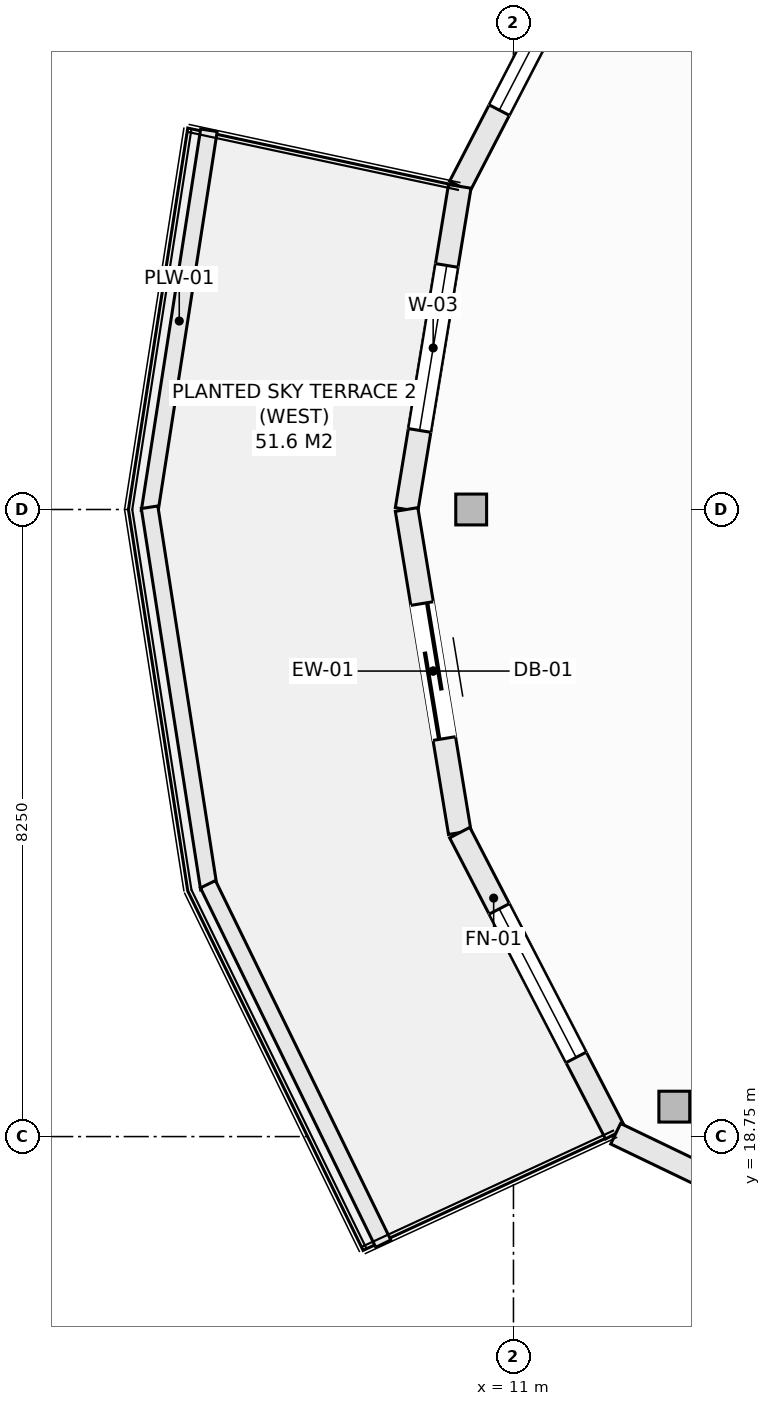
"""IFC4 building model, lengths in metres.
Left out: names, types, materials, properties, quantities, classifications, styles, units other than length and angle.
Written with IfcOpenShell. Run it as: python <this file> out.ifc"""

import sys

from ifc_helpers import new_model, si_unit, direction, frame, frame_2d, origin, origin_2d, place, context, subcontext, project, spatial, rectangle, hollow_rectangle, extrude, element, fill, save


model = new_model("IFC4")
c1 = context("Model", 3, precision=1e-05, world=origin(), true_north=direction((0.0, 1.0)))
c2 = subcontext(c1, "Body", "Model", "MODEL_VIEW")
j1 = project(units=[si_unit("LENGTHUNIT", "METRE"), si_unit("PLANEANGLEUNIT", "RADIAN")], contexts=[c1])
p1 = place(None, origin())
s1 = spatial("IfcSite", under=j1, at=p1, CompositionType="ELEMENT")
p2 = place(p1, origin())
s2 = spatial("IfcBuilding", under=s1, at=p2, CompositionType="ELEMENT")
p3 = place(p2, frame((0.0, 0.0, 262.4)))
s3 = spatial("IfcBuildingStorey", under=s2, at=p3, CompositionType="ELEMENT", Elevation=262.4)
for number, where, z_axis, x_axis in (
    (1, (10.444, 27.0, -0.27), (0.0, 0.0, 1.0), (1.0, 0.0, 0.0)),
    (2, (13.116, 19.144, -0.27), (0.0, 0.0, 1.0), (1.0, 0.0, 0.0)),
):
    element("IfcColumn", number, at=place(p3, frame(where, z_axis=z_axis, x_axis=x_axis)), inside=s3, PredefinedType="COLUMN", context=c2, shape_type="SweptSolid", body=[
        extrude(hollow_rectangle(XDim=0.406, YDim=0.406, WallThickness=0.016, at=origin_2d()), origin(), (0.0, 0.0, 1.0), 3.3),
    ])
p4 = place(p3, frame((10.293, 31.251, 0.0), z_axis=(0.0, 0.0, 1.0), x_axis=(0.459801070243, 0.888021945564, 0.0)))
e3 = element("IfcWall", 3, at=p4, inside=s3, PredefinedType="SOLIDWALL", context=c2, shape_type="SweptSolid", body=[
    extrude(rectangle(XDim=4.461, YDim=0.3, at=frame_2d((2.23, 0.0))), origin(), (0.0, 0.0, 1.0), 2.605),
])
p5 = place(p4, frame((1.13, 0.0, 0.72)))
e4 = element("IfcOpeningElement", 4, at=p5, cuts=e3, PredefinedType="OPENING", context=c2, shape_type="SweptSolid", body=[
    extrude(rectangle(XDim=2.2, YDim=1.65, at=frame_2d((1.1, 0.825))), frame((0.0, 0.16, 0.0), z_axis=(0.0, -1.0, 0.0), x_axis=(1.0, 0.0, 0.0)), (0.0, 0.0, 1.0), 0.32),
])
p6 = place(p3, frame((9.594, 27.0, 0.0), z_axis=(0.0, 0.0, 1.0), x_axis=(0.162404622434, 0.98672424649, 0.0)))
e5 = element("IfcWall", 5, at=p6, inside=s3, PredefinedType="SOLIDWALL", context=c2, shape_type="SweptSolid", body=[
    extrude(rectangle(XDim=4.308, YDim=0.3, at=frame_2d((2.154, 0.0))), origin(), (0.0, 0.0, 1.0), 2.605),
])
p7 = place(p6, frame((1.054, 0.0, 0.72)))
e6 = element("IfcOpeningElement", 6, at=p7, cuts=e5, PredefinedType="OPENING", context=c2, shape_type="SweptSolid", body=[
    extrude(rectangle(XDim=2.2, YDim=1.65, at=frame_2d((1.1, 0.825))), frame((0.0, 0.16, 0.0), z_axis=(0.0, -1.0, 0.0), x_axis=(1.0, 0.0, 0.0)), (0.0, 0.0, 1.0), 0.32),
])
p8 = place(p3, frame((9.594, 27.0, 0.0), z_axis=(0.0, 0.0, 1.0), x_axis=(0.162404622434, -0.98672424649, 0.0)))
e7 = element("IfcWall", 7, at=p8, inside=s3, PredefinedType="SOLIDWALL", context=c2, shape_type="SweptSolid", body=[
    extrude(rectangle(XDim=4.308, YDim=0.3, at=frame_2d((2.154, 0.0))), origin(), (0.0, 0.0, 1.0), 2.605),
])
p9 = place(p8, frame((1.254, 0.0, 0.0)))
e8 = element("IfcOpeningElement", 8, at=p9, cuts=e7, PredefinedType="OPENING", context=c2, shape_type="SweptSolid", body=[
    extrude(rectangle(XDim=1.8, YDim=2.25, at=frame_2d((0.9, 1.125))), frame((0.0, 0.16, 0.0), z_axis=(0.0, -1.0, 0.0), x_axis=(1.0, 0.0, 0.0)), (0.0, 0.0, 1.0), 0.32),
])
p10 = place(p3, frame((10.293, 22.749, 0.0), z_axis=(0.0, 0.0, 1.0), x_axis=(0.459801070243, -0.888021945564, 0.0)))
e9 = element("IfcWall", 9, at=p10, inside=s3, PredefinedType="SOLIDWALL", context=c2, shape_type="SweptSolid", body=[
    extrude(rectangle(XDim=4.461, YDim=0.3, at=frame_2d((2.23, 0.0))), origin(), (0.0, 0.0, 1.0), 2.605),
])
p11 = place(p10, frame((1.13, 0.0, 0.72)))
e10 = element("IfcOpeningElement", 10, at=p11, cuts=e9, PredefinedType="OPENING", context=c2, shape_type="SweptSolid", body=[
    extrude(rectangle(XDim=2.2, YDim=1.65, at=frame_2d((1.1, 0.825))), frame((0.0, 0.16, 0.0), z_axis=(0.0, -1.0, 0.0), x_axis=(1.0, 0.0, 0.0)), (0.0, 0.0, 1.0), 0.32),
])
p12 = place(p3, frame((12.344, 18.788, 0.0), z_axis=(0.0, 0.0, 1.0), x_axis=(0.901346013132, -0.433099716706, 0.0)))
e11 = element("IfcWall", 11, at=p12, inside=s3, PredefinedType="SOLIDWALL", context=c2, shape_type="SweptSolid", body=[
    extrude(rectangle(XDim=4.994, YDim=0.3, at=frame_2d((2.497, 0.0))), origin(), (0.0, 0.0, 1.0), 2.605),
])
p13 = place(p12, frame((1.397, 0.0, 0.72)))
e12 = element("IfcOpeningElement", 12, at=p13, cuts=e11, PredefinedType="OPENING", context=c2, shape_type="SweptSolid", body=[
    extrude(rectangle(XDim=2.2, YDim=1.65, at=frame_2d((1.1, 0.825))), frame((0.0, 0.16, 0.0), z_axis=(0.0, -1.0, 0.0), x_axis=(1.0, 0.0, 0.0)), (0.0, 0.0, 1.0), 0.32),
])
for number, where, z_axis, x_axis in (
    (13, (6.212, 26.971, 0.0), (0.0, 0.0, 1.0), (0.154, 0.988, 0.0)),
    (14, (6.212, 27.029, 0.0), (0.0, 0.0, 1.0), (0.154, -0.988, 0.0)),
):
    element("IfcWall", number, at=place(p3, frame(where, z_axis=z_axis, x_axis=x_axis)), inside=s3, PredefinedType="PARAPET", context=c2, shape_type="SweptSolid", body=[
        extrude(rectangle(XDim=5.078, YDim=0.22, at=frame_2d((2.539, 0.0))), origin(), (0.0, 0.0, 1.0), 0.52),
    ])
p14 = place(p3, frame((6.98, 22.07, 0.0), z_axis=(0.0, 0.0, 1.0), x_axis=(0.438469339137, -0.898746148051, 0.0)))
e15 = element("IfcWall", 15, at=p14, inside=s3, PredefinedType="PARAPET", context=c2, shape_type="SweptSolid", body=[
    extrude(rectangle(XDim=5.262, YDim=0.22, at=frame_2d((2.631, 0.0))), origin(), (0.0, 0.0, 1.0), 0.52),
])
p15 = place(p5, origin())
e16 = element("IfcWindow", 16, at=p15, inside=s3, PartitioningType="SINGLE_PANEL", PredefinedType="WINDOW", context=c2, shape_type="SweptSolid", body=[
    extrude(rectangle(XDim=2.2, YDim=1.65, at=frame_2d((1.1, 0.825))), frame((0.0, 0.03, 0.0), z_axis=(0.0, -1.0, 0.0), x_axis=(1.0, 0.0, 0.0)), (0.0, 0.0, 1.0), 0.06),
])
fill(e4, e16)
p16 = place(p7, origin())
e17 = element("IfcWindow", 17, at=p16, inside=s3, PartitioningType="SINGLE_PANEL", PredefinedType="WINDOW", context=c2, shape_type="SweptSolid", body=[
    extrude(rectangle(XDim=2.2, YDim=1.65, at=frame_2d((1.1, 0.825))), frame((0.0, 0.03, 0.0), z_axis=(0.0, -1.0, 0.0), x_axis=(1.0, 0.0, 0.0)), (0.0, 0.0, 1.0), 0.06),
])
fill(e6, e17)
p17 = place(p9, frame((1.8, 0.0, 0.0), z_axis=(0.0, 0.0, 1.0), x_axis=(-1.0, 0.0, 0.0)))
e18 = element("IfcDoor", 18, at=p17, inside=s3, OperationType="SLIDING_TO_LEFT", PredefinedType="DOOR", context=c2, shape_type="SweptSolid", body=[
    extrude(rectangle(XDim=1.8, YDim=2.25, at=frame_2d((0.9, 1.125))), frame((0.0, 0.025, 0.0), z_axis=(0.0, -1.0, 0.0), x_axis=(1.0, 0.0, 0.0)), (0.0, 0.0, 1.0), 0.05),
])
fill(e8, e18)
p18 = place(p11, origin())
e19 = element("IfcWindow", 19, at=p18, inside=s3, PartitioningType="SINGLE_PANEL", PredefinedType="WINDOW", context=c2, shape_type="SweptSolid", body=[
    extrude(rectangle(XDim=2.2, YDim=1.65, at=frame_2d((1.1, 0.825))), frame((0.0, 0.03, 0.0), z_axis=(0.0, -1.0, 0.0), x_axis=(1.0, 0.0, 0.0)), (0.0, 0.0, 1.0), 0.06),
])
fill(e10, e19)
save(model, sys.argv[1])
